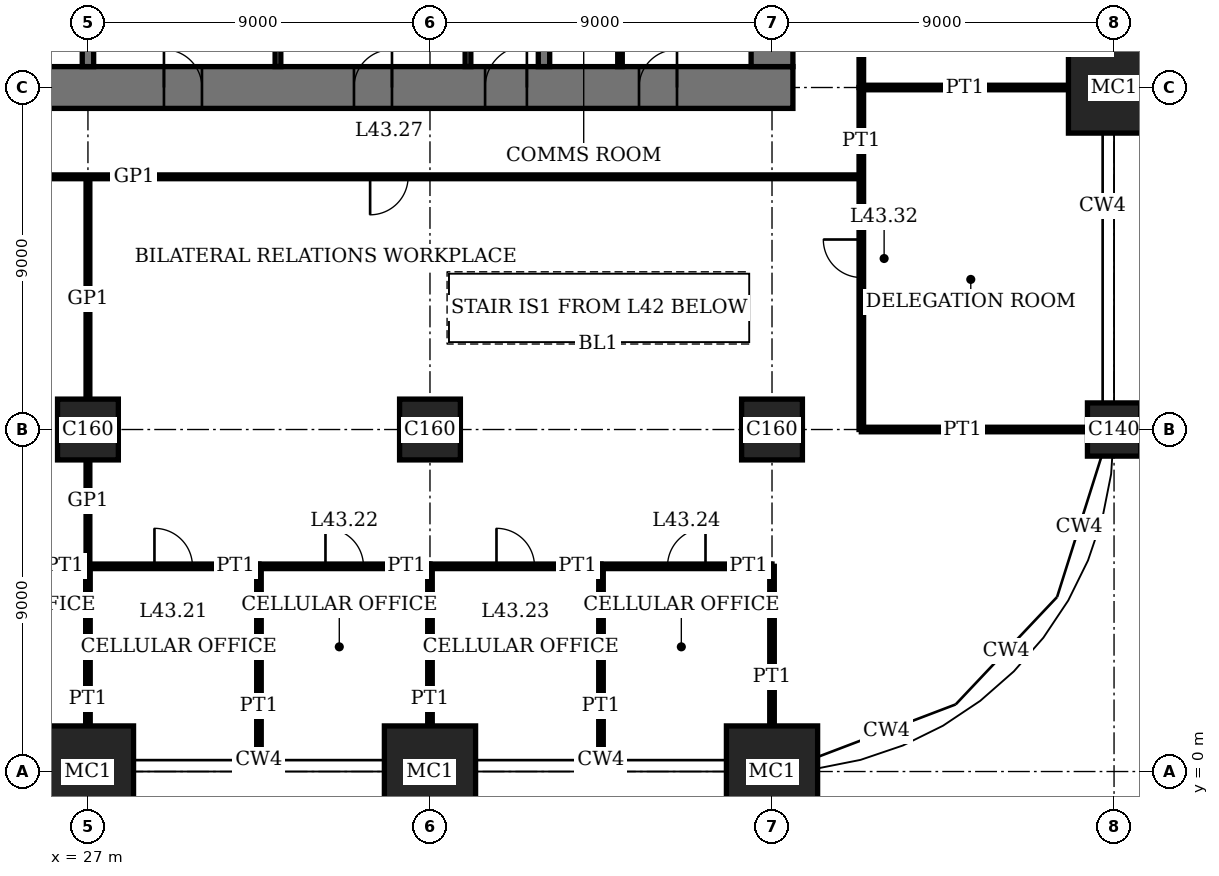
"""IFC4 building model, lengths in metres.
Left out: names, types, materials, properties, quantities, classifications, styles, units other than length and angle.
Written with IfcOpenShell. Run it as: python <this file> out.ifc"""

import sys

from ifc_helpers import new_model, si_unit, direction, frame, frame_2d, origin, origin_2d, place, context, subcontext, project, spatial, rectangle, extrude, element, fill, save


model = new_model("IFC4")
c1 = context("Model", 3, precision=1e-05, world=origin(), true_north=direction((0.0, 1.0)))
c2 = subcontext(c1, "Body", "Model", "MODEL_VIEW")
j1 = project(units=[si_unit("LENGTHUNIT", "METRE"), si_unit("PLANEANGLEUNIT", "RADIAN")], contexts=[c1])
p1 = place(None, origin())
s1 = spatial("IfcSite", under=j1, at=p1, CompositionType="ELEMENT")
p2 = place(p1, origin())
s2 = spatial("IfcBuilding", under=s1, at=p2, CompositionType="ELEMENT")
p3 = place(p2, frame((0.0, 0.0, 178.2)))
s3 = spatial("IfcBuildingStorey", under=s2, at=p3, CompositionType="ELEMENT", Elevation=178.2)
p4 = place(p3, frame((27.0, 0.0, 0.0), z_axis=(0.0, 0.0, 1.0), x_axis=(1.0, 0.0, 0.0)))
e1 = element("IfcColumn", 1, at=p4, inside=s3, PredefinedType="COLUMN", context=c2, shape_type="SweptSolid", body=[
    extrude(rectangle(XDim=2.4, YDim=2.4, at=origin_2d()), origin(), (0.0, 0.0, 1.0), 4.0),
])
p5 = place(p3, frame((27.0, 9.0, 0.0), z_axis=(0.0, 0.0, 1.0), x_axis=(1.0, 0.0, 0.0)))
e2 = element("IfcColumn", 2, at=p5, inside=s3, PredefinedType="COLUMN", context=c2, shape_type="SweptSolid", body=[
    extrude(rectangle(XDim=1.6, YDim=1.6, at=origin_2d()), origin(), (0.0, 0.0, 1.0), 4.0),
])
p6 = place(p3, frame((36.0, 0.0, 0.0), z_axis=(0.0, 0.0, 1.0), x_axis=(1.0, 0.0, 0.0)))
e3 = element("IfcColumn", 3, at=p6, inside=s3, PredefinedType="COLUMN", context=c2, shape_type="SweptSolid", body=[
    extrude(rectangle(XDim=2.4, YDim=2.4, at=origin_2d()), origin(), (0.0, 0.0, 1.0), 4.0),
])
p7 = place(p3, frame((36.0, 9.0, 0.0), z_axis=(0.0, 0.0, 1.0), x_axis=(1.0, 0.0, 0.0)))
e4 = element("IfcColumn", 4, at=p7, inside=s3, PredefinedType="COLUMN", context=c2, shape_type="SweptSolid", body=[
    extrude(rectangle(XDim=1.6, YDim=1.6, at=origin_2d()), origin(), (0.0, 0.0, 1.0), 4.0),
])
p8 = place(p3, frame((45.0, 0.0, 0.0), z_axis=(0.0, 0.0, 1.0), x_axis=(1.0, 0.0, 0.0)))
e5 = element("IfcColumn", 5, at=p8, inside=s3, PredefinedType="COLUMN", context=c2, shape_type="SweptSolid", body=[
    extrude(rectangle(XDim=2.4, YDim=2.4, at=origin_2d()), origin(), (0.0, 0.0, 1.0), 4.0),
])
p9 = place(p3, frame((45.0, 9.0, 0.0), z_axis=(0.0, 0.0, 1.0), x_axis=(1.0, 0.0, 0.0)))
e6 = element("IfcColumn", 6, at=p9, inside=s3, PredefinedType="COLUMN", context=c2, shape_type="SweptSolid", body=[
    extrude(rectangle(XDim=1.6, YDim=1.6, at=origin_2d()), origin(), (0.0, 0.0, 1.0), 4.0),
])
p10 = place(p3, frame((54.0, 9.0, 0.0), z_axis=(0.0, 0.0, 1.0), x_axis=(1.0, 0.0, 0.0)))
e7 = element("IfcColumn", 7, at=p10, inside=s3, PredefinedType="COLUMN", context=c2, shape_type="SweptSolid", body=[
    extrude(rectangle(XDim=1.4, YDim=1.4, at=origin_2d()), origin(), (0.0, 0.0, 1.0), 4.0),
])
p11 = place(p3, frame((54.0, 18.0, 0.0), z_axis=(0.0, 0.0, 1.0), x_axis=(1.0, 0.0, 0.0)))
e8 = element("IfcColumn", 8, at=p11, inside=s3, PredefinedType="COLUMN", context=c2, shape_type="SweptSolid", body=[
    extrude(rectangle(XDim=2.4, YDim=2.4, at=origin_2d()), origin(), (0.0, 0.0, 1.0), 4.0),
])
p12 = place(p3, frame((17.45, 18.0, 0.0), z_axis=(0.0, 0.0, 1.0), x_axis=(1.0, 0.0, 0.0)))
e9 = element("IfcWall", 9, at=p12, inside=s3, PredefinedType="SHEAR", context=c2, shape_type="SweptSolid", body=[
    extrude(rectangle(XDim=28.1, YDim=1.1, at=frame_2d((14.05, 0.0))), origin(), (0.0, 0.0, 1.0), 4.0),
])
p13 = place(p12, frame((11.55, 0.0, 0.0)))
e10 = element("IfcOpeningElement", 10, at=p13, cuts=e9, PredefinedType="OPENING", context=c2, shape_type="SweptSolid", body=[
    extrude(rectangle(XDim=1.0, YDim=2.4, at=frame_2d((0.5, 1.2))), frame((0.0, 0.56, 0.0), z_axis=(0.0, -1.0, 0.0), x_axis=(1.0, 0.0, 0.0)), (0.0, 0.0, 1.0), 1.12),
])
p14 = place(p12, frame((16.55, 0.0, 0.0)))
e11 = element("IfcOpeningElement", 11, at=p14, cuts=e9, PredefinedType="OPENING", context=c2, shape_type="SweptSolid", body=[
    extrude(rectangle(XDim=1.0, YDim=2.4, at=frame_2d((0.5, 1.2))), frame((0.0, 0.56, 0.0), z_axis=(0.0, -1.0, 0.0), x_axis=(1.0, 0.0, 0.0)), (0.0, 0.0, 1.0), 1.12),
])
p15 = place(p12, frame((20.0, 0.0, 0.0)))
e12 = element("IfcOpeningElement", 12, at=p15, cuts=e9, PredefinedType="OPENING", context=c2, shape_type="SweptSolid", body=[
    extrude(rectangle(XDim=1.1, YDim=2.4, at=frame_2d((0.55, 1.2))), frame((0.0, 0.56, 0.0), z_axis=(0.0, -1.0, 0.0), x_axis=(1.0, 0.0, 0.0)), (0.0, 0.0, 1.0), 1.12),
])
p16 = place(p12, frame((24.05, 0.0, 0.0)))
e13 = element("IfcOpeningElement", 13, at=p16, cuts=e9, PredefinedType="OPENING", context=c2, shape_type="SweptSolid", body=[
    extrude(rectangle(XDim=1.0, YDim=2.4, at=frame_2d((0.5, 1.2))), frame((0.0, 0.56, 0.0), z_axis=(0.0, -1.0, 0.0), x_axis=(1.0, 0.0, 0.0)), (0.0, 0.0, 1.0), 1.12),
])
p17 = place(p3, frame((45.0, 18.55, 0.0), z_axis=(0.0, 0.0, 1.0), x_axis=(0.0, 1.0, 0.0)))
e14 = element("IfcWall", 14, at=p17, inside=s3, PredefinedType="SHEAR", context=c2, shape_type="SweptSolid", body=[
    extrude(rectangle(XDim=16.9, YDim=1.1, at=frame_2d((8.45, 0.0))), origin(), (0.0, 0.0, 1.0), 4.0),
])
p18 = place(p17, frame((8.45, 0.0, 0.0)))
e15 = element("IfcOpeningElement", 15, at=p18, cuts=e14, PredefinedType="OPENING", context=c2, shape_type="SweptSolid", body=[
    extrude(rectangle(XDim=1.8, YDim=2.4, at=frame_2d((0.9, 1.2))), frame((0.0, 0.56, 0.0), z_axis=(0.0, -1.0, 0.0), x_axis=(1.0, 0.0, 0.0)), (0.0, 0.0, 1.0), 1.12),
])
p19 = place(p3, frame((27.0, 18.55, 0.0), z_axis=(0.0, 0.0, 1.0), x_axis=(0.0, 1.0, 0.0)))
e16 = element("IfcWall", 16, at=p19, inside=s3, PredefinedType="SHEAR", context=c2, shape_type="SweptSolid", body=[
    extrude(rectangle(XDim=3.05, YDim=0.3, at=frame_2d((1.525, 0.0))), origin(), (0.0, 0.0, 1.0), 4.0),
])
p20 = place(p3, frame((39.0, 18.55, 0.0), z_axis=(0.0, 0.0, 1.0), x_axis=(0.0, 1.0, 0.0)))
e17 = element("IfcWall", 17, at=p20, inside=s3, PredefinedType="SHEAR", context=c2, shape_type="SweptSolid", body=[
    extrude(rectangle(XDim=5.9, YDim=0.3, at=frame_2d((2.95, 0.0))), origin(), (0.0, 0.0, 1.0), 4.0),
])
p21 = place(p3, frame((22.5, 5.4, 0.0), z_axis=(0.0, 0.0, 1.0), x_axis=(1.0, 0.0, 0.0)))
e18 = element("IfcWall", 18, at=p21, inside=s3, PredefinedType="PARTITIONING", context=c2, shape_type="SweptSolid", body=[
    extrude(rectangle(XDim=4.5, YDim=0.12, at=frame_2d((2.25, 0.0))), origin(), (0.0, 0.0, 1.0), 3.75),
])
p22 = place(p21, frame((1.75, 0.0, 0.0)))
e19 = element("IfcOpeningElement", 19, at=p22, cuts=e18, PredefinedType="OPENING", context=c2, shape_type="SweptSolid", body=[
    extrude(rectangle(XDim=1.0, YDim=2.4, at=frame_2d((0.5, 1.2))), frame((0.0, 0.07, 0.0), z_axis=(0.0, -1.0, 0.0), x_axis=(1.0, 0.0, 0.0)), (0.0, 0.0, 1.0), 0.14),
])
p23 = place(p3, frame((27.0, 5.4, 0.0), z_axis=(0.0, 0.0, 1.0), x_axis=(1.0, 0.0, 0.0)))
e20 = element("IfcWall", 20, at=p23, inside=s3, PredefinedType="PARTITIONING", context=c2, shape_type="SweptSolid", body=[
    extrude(rectangle(XDim=4.5, YDim=0.12, at=frame_2d((2.25, 0.0))), origin(), (0.0, 0.0, 1.0), 3.75),
])
p24 = place(p23, frame((1.75, 0.0, 0.0)))
e21 = element("IfcOpeningElement", 21, at=p24, cuts=e20, PredefinedType="OPENING", context=c2, shape_type="SweptSolid", body=[
    extrude(rectangle(XDim=1.0, YDim=2.4, at=frame_2d((0.5, 1.2))), frame((0.0, 0.07, 0.0), z_axis=(0.0, -1.0, 0.0), x_axis=(1.0, 0.0, 0.0)), (0.0, 0.0, 1.0), 0.14),
])
p25 = place(p3, frame((31.5, 5.4, 0.0), z_axis=(0.0, 0.0, 1.0), x_axis=(1.0, 0.0, 0.0)))
e22 = element("IfcWall", 22, at=p25, inside=s3, PredefinedType="PARTITIONING", context=c2, shape_type="SweptSolid", body=[
    extrude(rectangle(XDim=4.5, YDim=0.12, at=frame_2d((2.25, 0.0))), origin(), (0.0, 0.0, 1.0), 3.75),
])
p26 = place(p25, frame((1.75, 0.0, 0.0)))
e23 = element("IfcOpeningElement", 23, at=p26, cuts=e22, PredefinedType="OPENING", context=c2, shape_type="SweptSolid", body=[
    extrude(rectangle(XDim=1.0, YDim=2.4, at=frame_2d((0.5, 1.2))), frame((0.0, 0.07, 0.0), z_axis=(0.0, -1.0, 0.0), x_axis=(1.0, 0.0, 0.0)), (0.0, 0.0, 1.0), 0.14),
])
p27 = place(p3, frame((36.0, 5.4, 0.0), z_axis=(0.0, 0.0, 1.0), x_axis=(1.0, 0.0, 0.0)))
e24 = element("IfcWall", 24, at=p27, inside=s3, PredefinedType="PARTITIONING", context=c2, shape_type="SweptSolid", body=[
    extrude(rectangle(XDim=4.5, YDim=0.12, at=frame_2d((2.25, 0.0))), origin(), (0.0, 0.0, 1.0), 3.75),
])
p28 = place(p27, frame((1.75, 0.0, 0.0)))
e25 = element("IfcOpeningElement", 25, at=p28, cuts=e24, PredefinedType="OPENING", context=c2, shape_type="SweptSolid", body=[
    extrude(rectangle(XDim=1.0, YDim=2.4, at=frame_2d((0.5, 1.2))), frame((0.0, 0.07, 0.0), z_axis=(0.0, -1.0, 0.0), x_axis=(1.0, 0.0, 0.0)), (0.0, 0.0, 1.0), 0.14),
])
p29 = place(p3, frame((40.5, 5.4, 0.0), z_axis=(0.0, 0.0, 1.0), x_axis=(1.0, 0.0, 0.0)))
e26 = element("IfcWall", 26, at=p29, inside=s3, PredefinedType="PARTITIONING", context=c2, shape_type="SweptSolid", body=[
    extrude(rectangle(XDim=4.5, YDim=0.12, at=frame_2d((2.25, 0.0))), origin(), (0.0, 0.0, 1.0), 3.75),
])
p30 = place(p29, frame((1.75, 0.0, 0.0)))
e27 = element("IfcOpeningElement", 27, at=p30, cuts=e26, PredefinedType="OPENING", context=c2, shape_type="SweptSolid", body=[
    extrude(rectangle(XDim=1.0, YDim=2.4, at=frame_2d((0.5, 1.2))), frame((0.0, 0.07, 0.0), z_axis=(0.0, -1.0, 0.0), x_axis=(1.0, 0.0, 0.0)), (0.0, 0.0, 1.0), 0.14),
])
p31 = place(p3, frame((47.35, 9.0, 0.0), z_axis=(0.0, 0.0, 1.0), x_axis=(1.0, 0.0, 0.0)))
e28 = element("IfcWall", 28, at=p31, inside=s3, PredefinedType="PARTITIONING", context=c2, shape_type="SweptSolid", body=[
    extrude(rectangle(XDim=5.95, YDim=0.12, at=frame_2d((2.975, 0.0))), origin(), (0.0, 0.0, 1.0), 3.05),
])
p32 = place(p3, frame((22.5, 15.65, 0.0), z_axis=(0.0, 0.0, 1.0), x_axis=(1.0, 0.0, 0.0)))
e29 = element("IfcWall", 29, at=p32, inside=s3, PredefinedType="PARTITIONING", context=c2, shape_type="SweptSolid", body=[
    extrude(rectangle(XDim=24.85, YDim=0.1, at=frame_2d((12.425, 0.0))), origin(), (0.0, 0.0, 1.0), 3.75),
])
p33 = place(p32, frame((11.925, 0.0, 0.0)))
e30 = element("IfcOpeningElement", 30, at=p33, cuts=e29, PredefinedType="OPENING", context=c2, shape_type="SweptSolid", body=[
    extrude(rectangle(XDim=1.0, YDim=2.4, at=frame_2d((0.5, 1.2))), frame((0.0, 0.06, 0.0), z_axis=(0.0, -1.0, 0.0), x_axis=(1.0, 0.0, 0.0)), (0.0, 0.0, 1.0), 0.12),
])
p34 = place(p3, frame((47.35, 18.0, 0.0), z_axis=(0.0, 0.0, 1.0), x_axis=(1.0, 0.0, 0.0)))
e31 = element("IfcWall", 31, at=p34, inside=s3, PredefinedType="PARTITIONING", context=c2, shape_type="SweptSolid", body=[
    extrude(rectangle(XDim=5.45, YDim=0.12, at=frame_2d((2.725, 0.0))), origin(), (0.0, 0.0, 1.0), 3.05),
])
p35 = place(p3, frame((27.0, 1.2, 0.0), z_axis=(0.0, 0.0, 1.0), x_axis=(0.0, 1.0, 0.0)))
e32 = element("IfcWall", 32, at=p35, inside=s3, PredefinedType="PARTITIONING", context=c2, shape_type="SweptSolid", body=[
    extrude(rectangle(XDim=4.2, YDim=0.12, at=frame_2d((2.1, 0.0))), origin(), (0.0, 0.0, 1.0), 3.05),
])
p36 = place(p3, frame((27.0, 5.4, 0.0), z_axis=(0.0, 0.0, 1.0), x_axis=(0.0, 1.0, 0.0)))
e33 = element("IfcWall", 33, at=p36, inside=s3, PredefinedType="PARTITIONING", context=c2, shape_type="SweptSolid", body=[
    extrude(rectangle(XDim=2.8, YDim=0.1, at=frame_2d((1.4, 0.0))), origin(), (0.0, 0.0, 1.0), 3.05),
])
p37 = place(p3, frame((27.0, 9.8, 0.0), z_axis=(0.0, 0.0, 1.0), x_axis=(0.0, 1.0, 0.0)))
e34 = element("IfcWall", 34, at=p37, inside=s3, PredefinedType="PARTITIONING", context=c2, shape_type="SweptSolid", body=[
    extrude(rectangle(XDim=5.85, YDim=0.1, at=frame_2d((2.925, 0.0))), origin(), (0.0, 0.0, 1.0), 3.05),
])
p38 = place(p3, frame((31.5, 0.31, 0.0), z_axis=(0.0, 0.0, 1.0), x_axis=(0.0, 1.0, 0.0)))
e35 = element("IfcWall", 35, at=p38, inside=s3, PredefinedType="PARTITIONING", context=c2, shape_type="SweptSolid", body=[
    extrude(rectangle(XDim=5.09, YDim=0.12, at=frame_2d((2.545, 0.0))), origin(), (0.0, 0.0, 1.0), 3.75),
])
p39 = place(p3, frame((36.0, 1.2, 0.0), z_axis=(0.0, 0.0, 1.0), x_axis=(0.0, 1.0, 0.0)))
e36 = element("IfcWall", 36, at=p39, inside=s3, PredefinedType="PARTITIONING", context=c2, shape_type="SweptSolid", body=[
    extrude(rectangle(XDim=4.2, YDim=0.12, at=frame_2d((2.1, 0.0))), origin(), (0.0, 0.0, 1.0), 3.05),
])
p40 = place(p3, frame((40.5, 0.31, 0.0), z_axis=(0.0, 0.0, 1.0), x_axis=(0.0, 1.0, 0.0)))
e37 = element("IfcWall", 37, at=p40, inside=s3, PredefinedType="PARTITIONING", context=c2, shape_type="SweptSolid", body=[
    extrude(rectangle(XDim=5.09, YDim=0.12, at=frame_2d((2.545, 0.0))), origin(), (0.0, 0.0, 1.0), 3.75),
])
p41 = place(p3, frame((45.0, 1.2, 0.0), z_axis=(0.0, 0.0, 1.0), x_axis=(0.0, 1.0, 0.0)))
e38 = element("IfcWall", 38, at=p41, inside=s3, PredefinedType="PARTITIONING", context=c2, shape_type="SweptSolid", body=[
    extrude(rectangle(XDim=4.2, YDim=0.12, at=frame_2d((2.1, 0.0))), origin(), (0.0, 0.0, 1.0), 3.05),
])
p42 = place(p3, frame((47.35, 9.0, 0.0), z_axis=(0.0, 0.0, 1.0), x_axis=(0.0, 1.0, 0.0)))
e39 = element("IfcWall", 39, at=p42, inside=s3, PredefinedType="PARTITIONING", context=c2, shape_type="SweptSolid", body=[
    extrude(rectangle(XDim=9.0, YDim=0.12, at=frame_2d((4.5, 0.0))), origin(), (0.0, 0.0, 1.0), 3.75),
])
p43 = place(p42, frame((4.0, 0.0, 0.0)))
e40 = element("IfcOpeningElement", 40, at=p43, cuts=e39, PredefinedType="OPENING", context=c2, shape_type="SweptSolid", body=[
    extrude(rectangle(XDim=1.0, YDim=2.4, at=frame_2d((0.5, 1.2))), frame((0.0, 0.07, 0.0), z_axis=(0.0, -1.0, 0.0), x_axis=(1.0, 0.0, 0.0)), (0.0, 0.0, 1.0), 0.14),
])
p44 = place(p3, frame((47.35, 18.0, 0.0), z_axis=(0.0, 0.0, 1.0), x_axis=(0.0, 1.0, 0.0)))
e41 = element("IfcWall", 41, at=p44, inside=s3, PredefinedType="PARTITIONING", context=c2, shape_type="SweptSolid", body=[
    extrude(rectangle(XDim=4.5, YDim=0.12, at=frame_2d((2.25, 0.0))), origin(), (0.0, 0.0, 1.0), 3.75),
])
p45 = place(p44, frame((1.75, 0.0, 0.0)))
e42 = element("IfcOpeningElement", 42, at=p45, cuts=e41, PredefinedType="OPENING", context=c2, shape_type="SweptSolid", body=[
    extrude(rectangle(XDim=1.0, YDim=2.4, at=frame_2d((0.5, 1.2))), frame((0.0, 0.07, 0.0), z_axis=(0.0, -1.0, 0.0), x_axis=(1.0, 0.0, 0.0)), (0.0, 0.0, 1.0), 0.14),
])
for number, where, z_axis, x_axis in (
    (43, (32.0, 18.55, 0.0), (0.0, 0.0, 1.0), (0.0, 1.0, 0.0)),
    (44, (37.0, 18.55, 0.0), (0.0, 0.0, 1.0), (0.0, 1.0, 0.0)),
):
    element("IfcWall", number, at=place(p3, frame(where, z_axis=z_axis, x_axis=x_axis)), inside=s3, PredefinedType="PARTITIONING", context=c2, shape_type="SweptSolid", body=[
        extrude(rectangle(XDim=2.9, YDim=0.15, at=frame_2d((1.45, 0.0))), origin(), (0.0, 0.0, 1.0), 3.75),
    ])
p46 = place(p3, frame((41.0, 18.55, 0.0), z_axis=(0.0, 0.0, 1.0), x_axis=(0.0, 1.0, 0.0)))
e45 = element("IfcWall", 45, at=p46, inside=s3, PredefinedType="PARTITIONING", context=c2, shape_type="SweptSolid", body=[
    extrude(rectangle(XDim=2.9, YDim=0.12, at=frame_2d((1.45, 0.0))), origin(), (0.0, 0.0, 1.0), 3.75),
])
p47 = place(p46, frame((0.95, 0.0, 0.0)))
e46 = element("IfcOpeningElement", 46, at=p47, cuts=e45, PredefinedType="OPENING", context=c2, shape_type="SweptSolid", body=[
    extrude(rectangle(XDim=1.0, YDim=2.4, at=frame_2d((0.5, 1.2))), frame((0.0, 0.07, 0.0), z_axis=(0.0, -1.0, 0.0), x_axis=(1.0, 0.0, 0.0)), (0.0, 0.0, 1.0), 0.14),
])
p48 = place(p13, origin())
e47 = element("IfcDoor", 47, at=p48, inside=s3, OperationType="SINGLE_SWING_RIGHT", PredefinedType="DOOR", context=c2, shape_type="SweptSolid", body=[
    extrude(rectangle(XDim=1.0, YDim=2.4, at=frame_2d((0.5, 1.2))), frame((0.0, 0.025, 0.0), z_axis=(0.0, -1.0, 0.0), x_axis=(1.0, 0.0, 0.0)), (0.0, 0.0, 1.0), 0.05),
    extrude(rectangle(XDim=0.04, YDim=2.4, at=frame_2d((0.02, 1.2))), frame((0.0, 0.4, 0.0), z_axis=(0.0, -1.0, 0.0), x_axis=(1.0, 0.0, 0.0)), (0.0, 0.0, 1.0), 0.8),
    extrude(rectangle(XDim=0.04, YDim=2.4, at=frame_2d((0.98, 1.2))), frame((0.0, 0.4, 0.0), z_axis=(0.0, -1.0, 0.0), x_axis=(1.0, 0.0, 0.0)), (0.0, 0.0, 1.0), 0.8),
    extrude(rectangle(XDim=1.0, YDim=0.04, at=frame_2d((0.5, 2.38))), frame((0.0, 0.4, 0.0), z_axis=(0.0, -1.0, 0.0), x_axis=(1.0, 0.0, 0.0)), (0.0, 0.0, 1.0), 0.8),
])
fill(e10, e47)
p49 = place(p14, origin())
e48 = element("IfcDoor", 48, at=p49, inside=s3, OperationType="SINGLE_SWING_LEFT", PredefinedType="DOOR", context=c2, shape_type="SweptSolid", body=[
    extrude(rectangle(XDim=1.0, YDim=2.4, at=frame_2d((0.5, 1.2))), frame((0.0, 0.025, 0.0), z_axis=(0.0, -1.0, 0.0), x_axis=(1.0, 0.0, 0.0)), (0.0, 0.0, 1.0), 0.05),
    extrude(rectangle(XDim=0.04, YDim=2.4, at=frame_2d((0.02, 1.2))), frame((0.0, 0.4, 0.0), z_axis=(0.0, -1.0, 0.0), x_axis=(1.0, 0.0, 0.0)), (0.0, 0.0, 1.0), 0.8),
    extrude(rectangle(XDim=0.04, YDim=2.4, at=frame_2d((0.98, 1.2))), frame((0.0, 0.4, 0.0), z_axis=(0.0, -1.0, 0.0), x_axis=(1.0, 0.0, 0.0)), (0.0, 0.0, 1.0), 0.8),
    extrude(rectangle(XDim=1.0, YDim=0.04, at=frame_2d((0.5, 2.38))), frame((0.0, 0.4, 0.0), z_axis=(0.0, -1.0, 0.0), x_axis=(1.0, 0.0, 0.0)), (0.0, 0.0, 1.0), 0.8),
])
fill(e11, e48)
p50 = place(p15, origin())
e49 = element("IfcDoor", 49, at=p50, inside=s3, OperationType="SINGLE_SWING_LEFT", PredefinedType="DOOR", context=c2, shape_type="SweptSolid", body=[
    extrude(rectangle(XDim=1.1, YDim=2.4, at=frame_2d((0.55, 1.2))), frame((0.0, 0.025, 0.0), z_axis=(0.0, -1.0, 0.0), x_axis=(1.0, 0.0, 0.0)), (0.0, 0.0, 1.0), 0.05),
    extrude(rectangle(XDim=0.04, YDim=2.4, at=frame_2d((0.02, 1.2))), frame((0.0, 0.44, 0.0), z_axis=(0.0, -1.0, 0.0), x_axis=(1.0, 0.0, 0.0)), (0.0, 0.0, 1.0), 0.88),
    extrude(rectangle(XDim=0.04, YDim=2.4, at=frame_2d((1.08, 1.2))), frame((0.0, 0.44, 0.0), z_axis=(0.0, -1.0, 0.0), x_axis=(1.0, 0.0, 0.0)), (0.0, 0.0, 1.0), 0.88),
    extrude(rectangle(XDim=1.1, YDim=0.04, at=frame_2d((0.55, 2.38))), frame((0.0, 0.44, 0.0), z_axis=(0.0, -1.0, 0.0), x_axis=(1.0, 0.0, 0.0)), (0.0, 0.0, 1.0), 0.88),
])
fill(e12, e49)
p51 = place(p16, origin())
e50 = element("IfcDoor", 50, at=p51, inside=s3, OperationType="SINGLE_SWING_LEFT", PredefinedType="DOOR", context=c2, shape_type="SweptSolid", body=[
    extrude(rectangle(XDim=1.0, YDim=2.4, at=frame_2d((0.5, 1.2))), frame((0.0, 0.025, 0.0), z_axis=(0.0, -1.0, 0.0), x_axis=(1.0, 0.0, 0.0)), (0.0, 0.0, 1.0), 0.05),
    extrude(rectangle(XDim=0.04, YDim=2.4, at=frame_2d((0.02, 1.2))), frame((0.0, 0.4, 0.0), z_axis=(0.0, -1.0, 0.0), x_axis=(1.0, 0.0, 0.0)), (0.0, 0.0, 1.0), 0.8),
    extrude(rectangle(XDim=0.04, YDim=2.4, at=frame_2d((0.98, 1.2))), frame((0.0, 0.4, 0.0), z_axis=(0.0, -1.0, 0.0), x_axis=(1.0, 0.0, 0.0)), (0.0, 0.0, 1.0), 0.8),
    extrude(rectangle(XDim=1.0, YDim=0.04, at=frame_2d((0.5, 2.38))), frame((0.0, 0.4, 0.0), z_axis=(0.0, -1.0, 0.0), x_axis=(1.0, 0.0, 0.0)), (0.0, 0.0, 1.0), 0.8),
])
fill(e13, e50)
p52 = place(p24, origin())
e51 = element("IfcDoor", 51, at=p52, inside=s3, OperationType="SINGLE_SWING_RIGHT", PredefinedType="DOOR", context=c2, shape_type="SweptSolid", body=[
    extrude(rectangle(XDim=1.0, YDim=2.4, at=frame_2d((0.5, 1.2))), frame((0.0, 0.025, 0.0), z_axis=(0.0, -1.0, 0.0), x_axis=(1.0, 0.0, 0.0)), (0.0, 0.0, 1.0), 0.05),
])
fill(e21, e51)
p53 = place(p26, origin())
e52 = element("IfcDoor", 52, at=p53, inside=s3, OperationType="SINGLE_SWING_RIGHT", PredefinedType="DOOR", context=c2, shape_type="SweptSolid", body=[
    extrude(rectangle(XDim=1.0, YDim=2.4, at=frame_2d((0.5, 1.2))), frame((0.0, 0.025, 0.0), z_axis=(0.0, -1.0, 0.0), x_axis=(1.0, 0.0, 0.0)), (0.0, 0.0, 1.0), 0.05),
])
fill(e23, e52)
p54 = place(p28, origin())
e53 = element("IfcDoor", 53, at=p54, inside=s3, OperationType="SINGLE_SWING_RIGHT", PredefinedType="DOOR", context=c2, shape_type="SweptSolid", body=[
    extrude(rectangle(XDim=1.0, YDim=2.4, at=frame_2d((0.5, 1.2))), frame((0.0, 0.025, 0.0), z_axis=(0.0, -1.0, 0.0), x_axis=(1.0, 0.0, 0.0)), (0.0, 0.0, 1.0), 0.05),
])
fill(e25, e53)
p55 = place(p30, origin())
e54 = element("IfcDoor", 54, at=p55, inside=s3, OperationType="SINGLE_SWING_LEFT", PredefinedType="DOOR", context=c2, shape_type="SweptSolid", body=[
    extrude(rectangle(XDim=1.0, YDim=2.4, at=frame_2d((0.5, 1.2))), frame((0.0, 0.025, 0.0), z_axis=(0.0, -1.0, 0.0), x_axis=(1.0, 0.0, 0.0)), (0.0, 0.0, 1.0), 0.05),
])
fill(e27, e54)
p56 = place(p33, origin())
e55 = element("IfcDoor", 55, at=p56, inside=s3, OperationType="SINGLE_SWING_LEFT", PredefinedType="DOOR", context=c2, shape_type="SweptSolid", body=[
    extrude(rectangle(XDim=1.0, YDim=2.4, at=frame_2d((0.5, 1.2))), frame((0.0, 0.02, 0.0), z_axis=(0.0, -1.0, 0.0), x_axis=(1.0, 0.0, 0.0)), (0.0, 0.0, 1.0), 0.04),
])
fill(e30, e55)
p57 = place(p43, origin())
e56 = element("IfcDoor", 56, at=p57, inside=s3, OperationType="SINGLE_SWING_LEFT", PredefinedType="DOOR", context=c2, shape_type="SweptSolid", body=[
    extrude(rectangle(XDim=1.0, YDim=2.4, at=frame_2d((0.5, 1.2))), frame((0.0, 0.025, 0.0), z_axis=(0.0, -1.0, 0.0), x_axis=(1.0, 0.0, 0.0)), (0.0, 0.0, 1.0), 0.05),
])
fill(e40, e56)
save(model, sys.argv[1])
